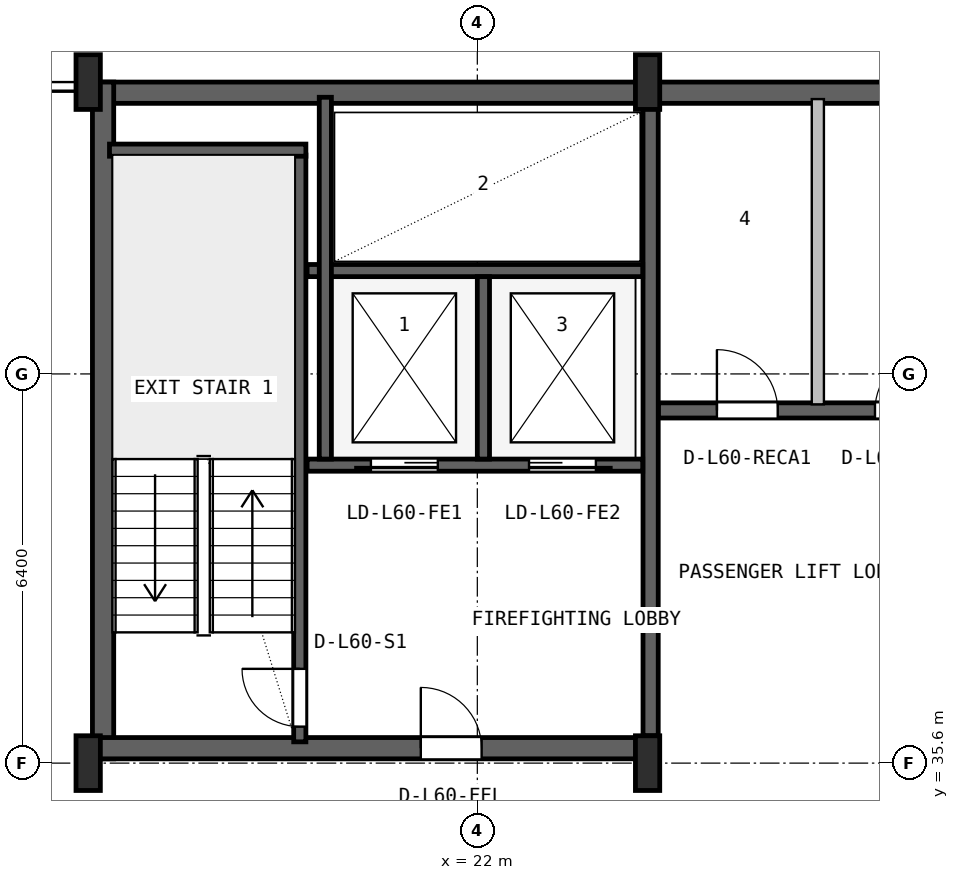
"""IFC4 building model, lengths in metres.
Left out: names, types, materials, properties, quantities, classifications, styles, units other than length and angle.
Written with IfcOpenShell. Run it as: python <this file> out.ifc"""

import sys

from ifc_helpers import new_model, si_unit, direction, frame, frame_2d, origin, origin_2d, place, context, subcontext, project, spatial, rectangle, i_section, extrude, source, transform, mapped, element, fill, save


model = new_model("IFC4")
c1 = context("Model", 3, precision=1e-05, world=origin(), true_north=direction((0.0, 1.0)))
c2 = subcontext(c1, "Body", "Model", "MODEL_VIEW")
j1 = project(units=[si_unit("LENGTHUNIT", "METRE"), si_unit("PLANEANGLEUNIT", "RADIAN")], contexts=[c1])
p1 = place(None, origin())
s1 = spatial("IfcSite", under=j1, at=p1, CompositionType="ELEMENT")
p2 = place(p1, origin())
s2 = spatial("IfcBuilding", under=s1, at=p2, CompositionType="ELEMENT")
p3 = place(p2, frame((0.0, 0.0, 243.2)))
s3 = spatial("IfcBuildingStorey", under=s2, at=p3, CompositionType="ELEMENT", Elevation=243.2)
p4 = place(p3, frame((15.6, 46.625, 0.0), z_axis=(0.0, 0.0, 1.0), x_axis=(1.0, 0.0, 0.0)))
e1 = element("IfcWall", 1, at=p4, inside=s3, PredefinedType="SHEAR", context=c2, shape_type="SweptSolid", body=[
    extrude(rectangle(XDim=36.8, YDim=0.35, at=frame_2d((18.4, 0.0))), origin(), (0.0, 0.0, 1.0), 3.55),
])
p5 = place(p3, frame((15.845, 35.67, 0.0), z_axis=(0.0, 0.0, 1.0), x_axis=(0.0, 1.0, 0.0)))
e2 = element("IfcWall", 2, at=p5, inside=s3, PredefinedType="SHEAR", context=c2, shape_type="SweptSolid", body=[
    extrude(rectangle(XDim=11.13, YDim=0.35, at=frame_2d((5.565, 0.0))), origin(), (0.0, 0.0, 1.0), 3.55),
])
p6 = place(p3, frame((15.67, 35.845, 0.0), z_axis=(0.0, 0.0, 1.0), x_axis=(1.0, 0.0, 0.0)))
e3 = element("IfcWall", 3, at=p6, inside=s3, PredefinedType="SHEAR", context=c2, shape_type="SweptSolid", body=[
    extrude(rectangle(XDim=9.13, YDim=0.35, at=frame_2d((4.565, 0.0))), origin(), (0.0, 0.0, 1.0), 3.55),
])
p7 = place(p6, frame((5.4, 0.0, 0.0)))
e4 = element("IfcOpeningElement", 4, at=p7, cuts=e3, PredefinedType="OPENING", context=c2, shape_type="SweptSolid", body=[
    extrude(rectangle(XDim=1.0, YDim=2.1, at=frame_2d((0.5, 1.05))), frame((0.0, 0.185, 0.0), z_axis=(0.0, -1.0, 0.0), x_axis=(1.0, 0.0, 0.0)), (0.0, 0.0, 1.0), 0.37),
])
m1 = source(origin(), c2, "Body", "SweptSolid", [
    extrude(i_section(OverallWidth=0.4, OverallDepth=0.9, WebThickness=0.016, FlangeThickness=0.028, FilletRadius=0.016, at=origin_2d()), origin(), (0.0, 0.0, 1.0), 3.8),
])
for number, where, z_axis, x_axis in (
    (5, (15.6, 35.6, 0.0), (0.0, 0.0, 1.0), (1.0, 0.0, 0.0)),
    (6, (15.6, 46.8, 0.0), (0.0, 0.0, 1.0), (1.0, 0.0, 0.0)),
    (7, (24.8, 35.6, 0.0), (0.0, 0.0, 1.0), (1.0, 0.0, 0.0)),
    (8, (24.8, 46.8, 0.0), (0.0, 0.0, 1.0), (1.0, 0.0, 0.0)),
):
    element("IfcColumn", number, at=place(p3, frame(where, z_axis=z_axis, x_axis=x_axis)), inside=s3, PredefinedType="COLUMN", context=c2, shape_type="MappedRepresentation", body=[
        mapped(m1, transform((0.0, 0.0, 0.0), x_axis=(1.0, 0.0, 0.0), y_axis=(0.0, 1.0, 0.0), z_axis=(0.0, 0.0, 1.0), scale=1.0)),
    ])
p8 = place(p3, frame((19.08, 35.95, 0.0), z_axis=(0.0, 0.0, 1.0), x_axis=(0.0, 1.0, 0.0)))
e9 = element("IfcWall", 9, at=p8, inside=s3, PredefinedType="SHEAR", context=c2, shape_type="SweptSolid", body=[
    extrude(rectangle(XDim=9.65, YDim=0.2, at=frame_2d((4.825, 0.0))), origin(), (0.0, 0.0, 1.0), 3.55),
])
p9 = place(p8, frame((0.25, 0.0, 0.0)))
e10 = element("IfcOpeningElement", 10, at=p9, cuts=e9, PredefinedType="OPENING", context=c2, shape_type="SweptSolid", body=[
    extrude(rectangle(XDim=0.95, YDim=2.1, at=frame_2d((0.475, 1.05))), frame((0.0, 0.11, 0.0), z_axis=(0.0, -1.0, 0.0), x_axis=(1.0, 0.0, 0.0)), (0.0, 0.0, 1.0), 0.22),
])
p10 = place(p3, frame((15.95, 45.68, 0.0), z_axis=(0.0, 0.0, 1.0), x_axis=(1.0, 0.0, 0.0)))
e11 = element("IfcWall", 11, at=p10, inside=s3, PredefinedType="SHEAR", context=c2, shape_type="SweptSolid", body=[
    extrude(rectangle(XDim=3.23, YDim=0.2, at=frame_2d((1.615, 0.0))), origin(), (0.0, 0.0, 1.0), 3.55),
])
p11 = place(p3, frame((24.85, 36.05, 0.0), z_axis=(0.0, 0.0, 1.0), x_axis=(0.0, 1.0, 0.0)))
e12 = element("IfcWall", 12, at=p11, inside=s3, PredefinedType="SHEAR", context=c2, shape_type="SweptSolid", body=[
    extrude(rectangle(XDim=10.45, YDim=0.25, at=frame_2d((5.225, 0.0))), origin(), (0.0, 0.0, 1.0), 3.55),
])
p12 = place(p3, frame((19.2, 40.5, 0.0), z_axis=(0.0, 0.0, 1.0), x_axis=(1.0, 0.0, 0.0)))
e13 = element("IfcWall", 13, at=p12, inside=s3, PredefinedType="SHEAR", context=c2, shape_type="SweptSolid", body=[
    extrude(rectangle(XDim=5.52, YDim=0.2, at=frame_2d((2.76, 0.0))), origin(), (0.0, 0.0, 1.0), 3.55),
])
p13 = place(p12, frame((1.05, 0.0, 0.0)))
e14 = element("IfcOpeningElement", 14, at=p13, cuts=e13, PredefinedType="OPENING", context=c2, shape_type="SweptSolid", body=[
    extrude(rectangle(XDim=1.1, YDim=2.18, at=frame_2d((0.55, 1.09))), frame((0.0, 0.11, 0.0), z_axis=(0.0, -1.0, 0.0), x_axis=(1.0, 0.0, 0.0)), (0.0, 0.0, 1.0), 0.22),
])
p14 = place(p12, frame((3.65, 0.0, 0.0)))
e15 = element("IfcOpeningElement", 15, at=p14, cuts=e13, PredefinedType="OPENING", context=c2, shape_type="SweptSolid", body=[
    extrude(rectangle(XDim=1.1, YDim=2.18, at=frame_2d((0.55, 1.09))), frame((0.0, 0.11, 0.0), z_axis=(0.0, -1.0, 0.0), x_axis=(1.0, 0.0, 0.0)), (0.0, 0.0, 1.0), 0.22),
])
p15 = place(p3, frame((19.2, 43.7, 0.0), z_axis=(0.0, 0.0, 1.0), x_axis=(1.0, 0.0, 0.0)))
e16 = element("IfcWall", 16, at=p15, inside=s3, PredefinedType="SHEAR", context=c2, shape_type="SweptSolid", body=[
    extrude(rectangle(XDim=5.52, YDim=0.2, at=frame_2d((2.76, 0.0))), origin(), (0.0, 0.0, 1.0), 3.55),
])
p16 = place(p3, frame((22.1, 40.6, 0.0), z_axis=(0.0, 0.0, 1.0), x_axis=(0.0, 1.0, 0.0)))
e17 = element("IfcWall", 17, at=p16, inside=s3, PredefinedType="SHEAR", context=c2, shape_type="SweptSolid", body=[
    extrude(rectangle(XDim=3.0, YDim=0.2, at=frame_2d((1.5, 0.0))), origin(), (0.0, 0.0, 1.0), 3.55),
])
p17 = place(p3, frame((19.5, 40.6, 0.0), z_axis=(0.0, 0.0, 1.0), x_axis=(0.0, 1.0, 0.0)))
e18 = element("IfcWall", 18, at=p17, inside=s3, PredefinedType="SHEAR", context=c2, shape_type="SweptSolid", body=[
    extrude(rectangle(XDim=5.95, YDim=0.2, at=frame_2d((2.975, 0.0))), origin(), (0.0, 0.0, 1.0), 3.55),
])
p18 = place(p3, frame((24.98, 41.4, 0.0), z_axis=(0.0, 0.0, 1.0), x_axis=(1.0, 0.0, 0.0)))
e19 = element("IfcWall", 19, at=p18, inside=s3, PredefinedType="SHEAR", context=c2, shape_type="SweptSolid", body=[
    extrude(rectangle(XDim=23.82, YDim=0.25, at=frame_2d((11.91, 0.0))), origin(), (0.0, 0.0, 1.0), 3.55),
])
p19 = place(p18, frame((16.87, 0.0, 0.0)))
e20 = element("IfcOpeningElement", 20, at=p19, cuts=e19, PredefinedType="OPENING", context=c2, shape_type="SweptSolid", body=[
    extrude(rectangle(XDim=1.1, YDim=2.18, at=frame_2d((0.55, 1.09))), frame((0.0, 0.135, 0.0), z_axis=(0.0, -1.0, 0.0), x_axis=(1.0, 0.0, 0.0)), (0.0, 0.0, 1.0), 0.27),
])
p20 = place(p18, frame((19.47, 0.0, 0.0)))
e21 = element("IfcOpeningElement", 21, at=p20, cuts=e19, PredefinedType="OPENING", context=c2, shape_type="SweptSolid", body=[
    extrude(rectangle(XDim=1.1, YDim=2.18, at=frame_2d((0.55, 1.09))), frame((0.0, 0.135, 0.0), z_axis=(0.0, -1.0, 0.0), x_axis=(1.0, 0.0, 0.0)), (0.0, 0.0, 1.0), 0.27),
])
p21 = place(p18, frame((22.07, 0.0, 0.0)))
e22 = element("IfcOpeningElement", 22, at=p21, cuts=e19, PredefinedType="OPENING", context=c2, shape_type="SweptSolid", body=[
    extrude(rectangle(XDim=1.1, YDim=2.18, at=frame_2d((0.55, 1.09))), frame((0.0, 0.135, 0.0), z_axis=(0.0, -1.0, 0.0), x_axis=(1.0, 0.0, 0.0)), (0.0, 0.0, 1.0), 0.27),
])
p22 = place(p18, frame((0.96, 0.0, 0.0)))
e23 = element("IfcOpeningElement", 23, at=p22, cuts=e19, PredefinedType="OPENING", context=c2, shape_type="SweptSolid", body=[
    extrude(rectangle(XDim=1.0, YDim=2.08, at=frame_2d((0.5, 1.04))), frame((0.0, 0.135, 0.0), z_axis=(0.0, -1.0, 0.0), x_axis=(1.0, 0.0, 0.0)), (0.0, 0.0, 1.0), 0.27),
])
p23 = place(p18, frame((3.56, 0.0, 0.0)))
e24 = element("IfcOpeningElement", 24, at=p23, cuts=e19, PredefinedType="OPENING", context=c2, shape_type="SweptSolid", body=[
    extrude(rectangle(XDim=1.0, YDim=2.08, at=frame_2d((0.5, 1.04))), frame((0.0, 0.135, 0.0), z_axis=(0.0, -1.0, 0.0), x_axis=(1.0, 0.0, 0.0)), (0.0, 0.0, 1.0), 0.27),
])
p24 = place(p18, frame((6.16, 0.0, 0.0)))
e25 = element("IfcOpeningElement", 25, at=p24, cuts=e19, PredefinedType="OPENING", context=c2, shape_type="SweptSolid", body=[
    extrude(rectangle(XDim=0.92, YDim=2.08, at=frame_2d((0.46, 1.04))), frame((0.0, 0.135, 0.0), z_axis=(0.0, -1.0, 0.0), x_axis=(1.0, 0.0, 0.0)), (0.0, 0.0, 1.0), 0.27),
])
p25 = place(p18, frame((11.56, 0.0, 0.0)))
e26 = element("IfcOpeningElement", 26, at=p25, cuts=e19, PredefinedType="OPENING", context=c2, shape_type="SweptSolid", body=[
    extrude(rectangle(XDim=1.0, YDim=2.08, at=frame_2d((0.5, 1.04))), frame((0.0, 0.135, 0.0), z_axis=(0.0, -1.0, 0.0), x_axis=(1.0, 0.0, 0.0)), (0.0, 0.0, 1.0), 0.27),
])
p26 = place(p3, frame((27.6, 41.5, 0.0), z_axis=(0.0, 0.0, 1.0), x_axis=(0.0, 1.0, 0.0)))
e27 = element("IfcWall", 27, at=p26, inside=s3, PredefinedType="SOLIDWALL", context=c2, shape_type="SweptSolid", body=[
    extrude(rectangle(XDim=5.02, YDim=0.2, at=frame_2d((2.51, 0.0))), origin(), (0.0, 0.0, 1.0), 3.53),
])
m2 = source(origin(), c2, "Body", "SweptSolid", [
    extrude(rectangle(XDim=0.95, YDim=2.1, at=frame_2d((0.475, 1.05))), frame((0.0, 0.025, 0.0), z_axis=(0.0, -1.0, 0.0), x_axis=(1.0, 0.0, 0.0)), (0.0, 0.0, 1.0), 0.05),
])
p27 = place(p9, origin())
e28 = element("IfcDoor", 28, at=p27, inside=s3, OperationType="SINGLE_SWING_RIGHT", PredefinedType="DOOR", context=c2, shape_type="MappedRepresentation", body=[
    mapped(m2, transform((0.0, 0.0, 0.0), x_axis=(1.0, 0.0, 0.0), y_axis=(0.0, 1.0, 0.0), z_axis=(0.0, 0.0, 1.0), scale=1.0)),
])
fill(e10, e28)
m3 = source(origin(), c2, "Body", "SweptSolid", [
    extrude(rectangle(XDim=1.0, YDim=2.1, at=frame_2d((0.5, 1.05))), frame((0.0, 0.025, 0.0), z_axis=(0.0, -1.0, 0.0), x_axis=(1.0, 0.0, 0.0)), (0.0, 0.0, 1.0), 0.05),
])
p28 = place(p7, origin())
e29 = element("IfcDoor", 29, at=p28, inside=s3, OperationType="SINGLE_SWING_LEFT", PredefinedType="DOOR", context=c2, shape_type="MappedRepresentation", body=[
    mapped(m3, transform((0.0, 0.0, 0.0), x_axis=(1.0, 0.0, 0.0), y_axis=(0.0, 1.0, 0.0), z_axis=(0.0, 0.0, 1.0), scale=1.0)),
])
fill(e4, e29)
m4 = source(origin(), c2, "Body", "SweptSolid", [
    extrude(rectangle(XDim=1.1, YDim=2.18, at=frame_2d((0.55, 1.09))), frame((0.0, 0.025, 0.0), z_axis=(0.0, -1.0, 0.0), x_axis=(1.0, 0.0, 0.0)), (0.0, 0.0, 1.0), 0.05),
])
p29 = place(p13, frame((1.1, 0.0, 0.0), z_axis=(0.0, 0.0, 1.0), x_axis=(-1.0, 0.0, 0.0)))
e30 = element("IfcDoor", 30, at=p29, inside=s3, OperationType="SLIDING_TO_LEFT", PredefinedType="DOOR", context=c2, shape_type="MappedRepresentation", body=[
    mapped(m4, transform((0.0, 0.0, 0.0), x_axis=(1.0, 0.0, 0.0), y_axis=(0.0, 1.0, 0.0), z_axis=(0.0, 0.0, 1.0), scale=1.0)),
])
fill(e14, e30)
p30 = place(p14, frame((1.1, 0.0, 0.0), z_axis=(0.0, 0.0, 1.0), x_axis=(-1.0, 0.0, 0.0)))
e31 = element("IfcDoor", 31, at=p30, inside=s3, OperationType="SLIDING_TO_RIGHT", PredefinedType="DOOR", context=c2, shape_type="MappedRepresentation", body=[
    mapped(m4, transform((0.0, 0.0, 0.0), x_axis=(1.0, 0.0, 0.0), y_axis=(0.0, 1.0, 0.0), z_axis=(0.0, 0.0, 1.0), scale=1.0)),
])
fill(e15, e31)
m5 = source(origin(), c2, "Body", "SweptSolid", [
    extrude(rectangle(XDim=1.0, YDim=2.08, at=frame_2d((0.5, 1.04))), frame((0.0, 0.025, 0.0), z_axis=(0.0, -1.0, 0.0), x_axis=(1.0, 0.0, 0.0)), (0.0, 0.0, 1.0), 0.05),
])
p31 = place(p22, origin())
e32 = element("IfcDoor", 32, at=p31, inside=s3, OperationType="SINGLE_SWING_LEFT", PredefinedType="DOOR", context=c2, shape_type="MappedRepresentation", body=[
    mapped(m5, transform((0.0, 0.0, 0.0), x_axis=(1.0, 0.0, 0.0), y_axis=(0.0, 1.0, 0.0), z_axis=(0.0, 0.0, 1.0), scale=1.0)),
])
fill(e23, e32)
p32 = place(p23, origin())
e33 = element("IfcDoor", 33, at=p32, inside=s3, OperationType="SINGLE_SWING_RIGHT", PredefinedType="DOOR", context=c2, shape_type="MappedRepresentation", body=[
    mapped(m5, transform((0.0, 0.0, 0.0), x_axis=(1.0, 0.0, 0.0), y_axis=(0.0, 1.0, 0.0), z_axis=(0.0, 0.0, 1.0), scale=1.0)),
])
fill(e24, e33)
save(model, sys.argv[1])
